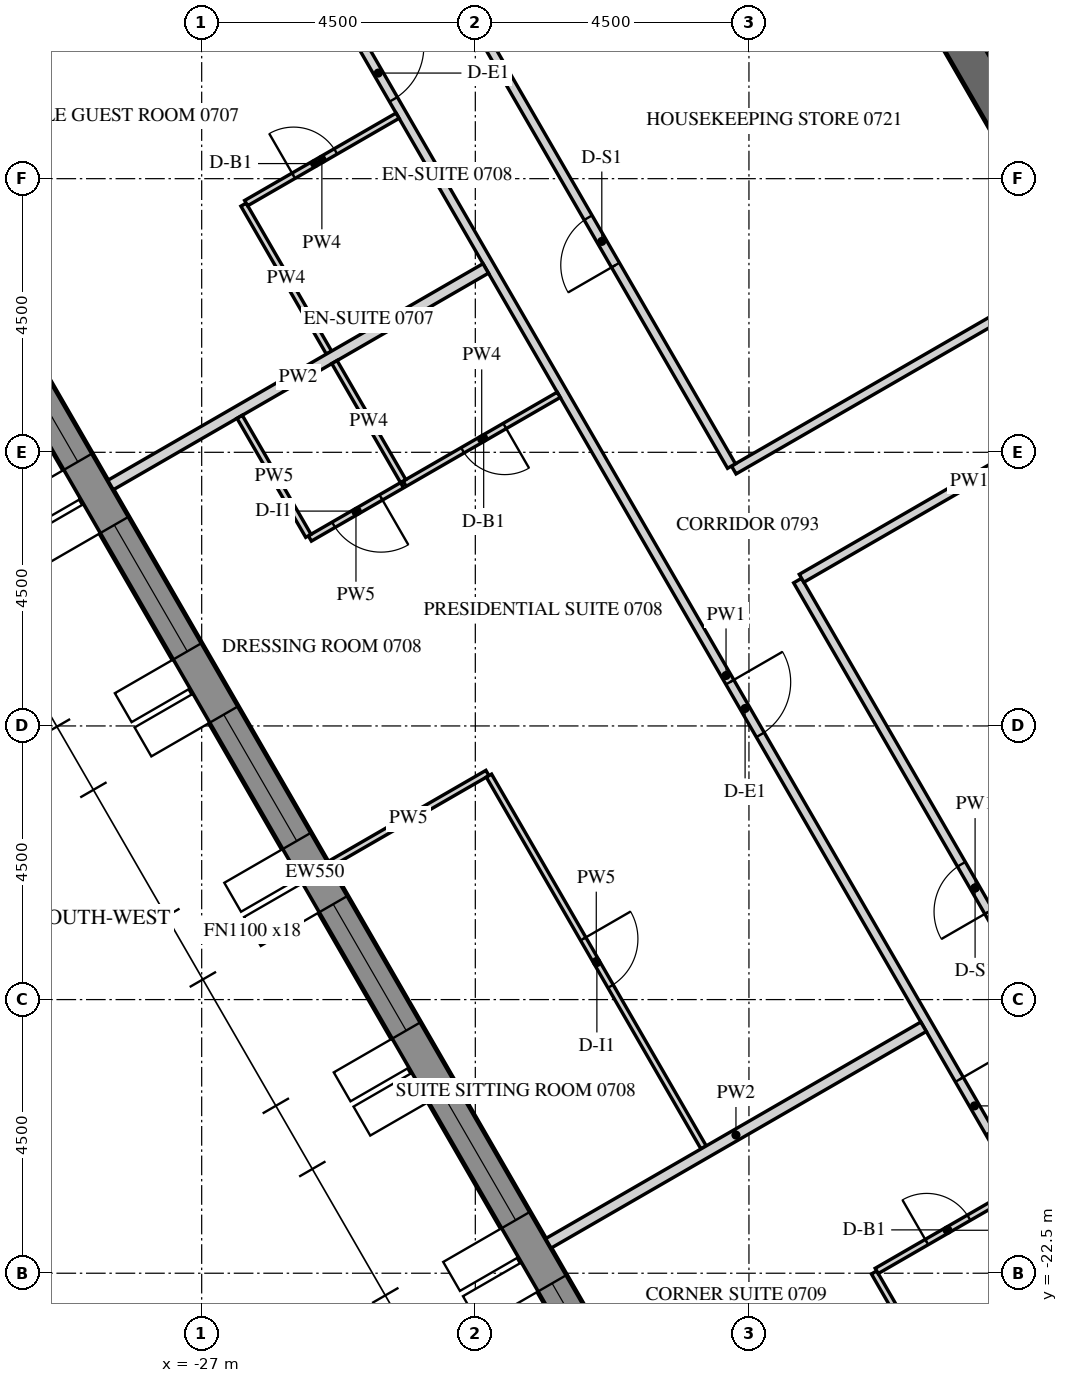
"""IFC4 building model, lengths in metres.
Left out: names, types, materials, properties, quantities, classifications, styles, units other than length and angle.
Written with IfcOpenShell. Run it as: python <this file> out.ifc"""

import sys

from ifc_helpers import new_model, si_unit, direction, frame, frame_2d, origin, place, context, subcontext, project, spatial, polyline, rectangle, outline, extrude, element, fill, save


model = new_model("IFC4")
c1 = context("Model", 3, precision=1e-05, world=origin(), true_north=direction((0.0, 1.0)))
c2 = subcontext(c1, "Body", "Model", "MODEL_VIEW")
j1 = project(units=[si_unit("LENGTHUNIT", "METRE"), si_unit("PLANEANGLEUNIT", "RADIAN")], contexts=[c1])
p1 = place(None, origin())
s1 = spatial("IfcSite", under=j1, at=p1, CompositionType="ELEMENT")
p2 = place(p1, origin())
s2 = spatial("IfcBuilding", under=s1, at=p2, CompositionType="ELEMENT")
p3 = place(p2, frame((0.0, 0.0, 99.9)))
s3 = spatial("IfcBuildingStorey", under=s2, at=p3, CompositionType="ELEMENT", Elevation=99.9)
p4 = place(p3, frame((-32.655, -2.89, -0.15), z_axis=(0.0, 0.0, 1.0), x_axis=(0.499997711317, -0.866026725152, 0.0)))
e1 = element("IfcWall", 1, at=p4, inside=s3, PredefinedType="SOLIDWALL", context=c2, shape_type="SweptSolid", body=[
    extrude(outline(polyline([(-0.022, -0.275), (30.097, -0.275), (30.045, 0.275), (0.022, 0.275), (-0.022, -0.275)])), origin(), (0.0, 0.0, 1.0), 3.9),
])
p5 = place(p4, frame((1.236, 0.0, 1.05)))
e2 = element("IfcOpeningElement", 2, at=p5, cuts=e1, PredefinedType="OPENING", context=c2, shape_type="SweptSolid", body=[
    extrude(rectangle(XDim=2.4, YDim=2.4, at=frame_2d((1.2, 1.2))), frame((0.0, 0.285, 0.0), z_axis=(0.0, -1.0, 0.0), x_axis=(1.0, 0.0, 0.0)), (0.0, 0.0, 1.0), 0.57),
])
p6 = place(p4, frame((4.835, 0.0, 1.05)))
e3 = element("IfcOpeningElement", 3, at=p6, cuts=e1, PredefinedType="OPENING", context=c2, shape_type="SweptSolid", body=[
    extrude(rectangle(XDim=2.4, YDim=2.4, at=frame_2d((1.2, 1.2))), frame((0.0, 0.285, 0.0), z_axis=(0.0, -1.0, 0.0), x_axis=(1.0, 0.0, 0.0)), (0.0, 0.0, 1.0), 0.57),
])
p7 = place(p4, frame((8.436, 0.0, 1.05)))
e4 = element("IfcOpeningElement", 4, at=p7, cuts=e1, PredefinedType="OPENING", context=c2, shape_type="SweptSolid", body=[
    extrude(rectangle(XDim=2.4, YDim=2.4, at=frame_2d((1.2, 1.2))), frame((0.0, 0.285, 0.0), z_axis=(0.0, -1.0, 0.0), x_axis=(1.0, 0.0, 0.0)), (0.0, 0.0, 1.0), 0.57),
])
p8 = place(p4, frame((12.035, 0.0, 1.05)))
e5 = element("IfcOpeningElement", 5, at=p8, cuts=e1, PredefinedType="OPENING", context=c2, shape_type="SweptSolid", body=[
    extrude(rectangle(XDim=2.4, YDim=2.4, at=frame_2d((1.2, 1.2))), frame((0.0, 0.285, 0.0), z_axis=(0.0, -1.0, 0.0), x_axis=(1.0, 0.0, 0.0)), (0.0, 0.0, 1.0), 0.57),
])
p9 = place(p4, frame((15.635, 0.0, 1.05)))
e6 = element("IfcOpeningElement", 6, at=p9, cuts=e1, PredefinedType="OPENING", context=c2, shape_type="SweptSolid", body=[
    extrude(rectangle(XDim=2.4, YDim=2.4, at=frame_2d((1.2, 1.2))), frame((0.0, 0.285, 0.0), z_axis=(0.0, -1.0, 0.0), x_axis=(1.0, 0.0, 0.0)), (0.0, 0.0, 1.0), 0.57),
])
p10 = place(p4, frame((19.236, 0.0, 1.05)))
e7 = element("IfcOpeningElement", 7, at=p10, cuts=e1, PredefinedType="OPENING", context=c2, shape_type="SweptSolid", body=[
    extrude(rectangle(XDim=2.4, YDim=2.4, at=frame_2d((1.2, 1.2))), frame((0.0, 0.285, 0.0), z_axis=(0.0, -1.0, 0.0), x_axis=(1.0, 0.0, 0.0)), (0.0, 0.0, 1.0), 0.57),
])
p11 = place(p4, frame((22.835, 0.0, 1.05)))
e8 = element("IfcOpeningElement", 8, at=p11, cuts=e1, PredefinedType="OPENING", context=c2, shape_type="SweptSolid", body=[
    extrude(rectangle(XDim=2.4, YDim=2.4, at=frame_2d((1.2, 1.2))), frame((0.0, 0.285, 0.0), z_axis=(0.0, -1.0, 0.0), x_axis=(1.0, 0.0, 0.0)), (0.0, 0.0, 1.0), 0.57),
])
p12 = place(p4, frame((26.436, 0.0, 1.05)))
e9 = element("IfcOpeningElement", 9, at=p12, cuts=e1, PredefinedType="OPENING", context=c2, shape_type="SweptSolid", body=[
    extrude(rectangle(XDim=2.4, YDim=2.4, at=frame_2d((1.2, 1.2))), frame((0.0, 0.285, 0.0), z_axis=(0.0, -1.0, 0.0), x_axis=(1.0, 0.0, 0.0)), (0.0, 0.0, 1.0), 0.57),
])
p13 = place(p3, frame((-15.819, 0.0, -0.15), z_axis=(0.0, 0.0, 1.0), x_axis=(0.499999880136, -0.866025472988, 0.0)))
e10 = element("IfcWall", 10, at=p13, inside=s3, PredefinedType="SHEAR", context=c2, shape_type="SweptSolid", body=[
    extrude(outline(polyline([(-0.173, -0.3), (15.993, -0.3), (15.646, 0.3), (0.173, 0.3), (-0.173, -0.3)])), origin(), (0.0, 0.0, 1.0), 3.9),
])
p14 = place(p13, frame((6.981, 0.0, 0.15)))
e11 = element("IfcOpeningElement", 11, at=p14, cuts=e10, PredefinedType="OPENING", context=c2, shape_type="SweptSolid", body=[
    extrude(rectangle(XDim=1.8, YDim=2.4, at=frame_2d((0.9, 1.2))), frame((0.0, 0.31, 0.0), z_axis=(0.0, -1.0, 0.0), x_axis=(1.0, 0.0, 0.0)), (0.0, 0.0, 1.0), 0.62),
])
p15 = place(p3, frame((-24.436, -2.175, 0.0), z_axis=(0.0, 0.0, 1.0), x_axis=(0.499996816197, -0.866027241946, 0.0)))
e12 = element("IfcWall", 12, at=p15, inside=s3, PredefinedType="PARTITIONING", context=c2, shape_type="SweptSolid", body=[
    extrude(rectangle(XDim=24.238, YDim=0.15, at=frame_2d((12.119, 0.0))), origin(), (0.0, 0.0, 1.0), 2.988),
])
p16 = place(p15, frame((0.179, 0.0, 0.0)))
e13 = element("IfcOpeningElement", 13, at=p16, cuts=e12, PredefinedType="OPENING", context=c2, shape_type="SweptSolid", body=[
    extrude(rectangle(XDim=1.0, YDim=2.1, at=frame_2d((0.5, 1.05))), frame((0.0, 0.085, 0.0), z_axis=(0.0, -1.0, 0.0), x_axis=(1.0, 0.0, 0.0)), (0.0, 0.0, 1.0), 0.17),
])
p17 = place(p15, frame((12.246, 0.0, 0.0)))
e14 = element("IfcOpeningElement", 14, at=p17, cuts=e12, PredefinedType="OPENING", context=c2, shape_type="SweptSolid", body=[
    extrude(rectangle(XDim=1.0, YDim=2.1, at=frame_2d((0.5, 1.05))), frame((0.0, 0.085, 0.0), z_axis=(0.0, -1.0, 0.0), x_axis=(1.0, 0.0, 0.0)), (0.0, 0.0, 1.0), 0.17),
])
p18 = place(p15, frame((19.792, 0.0, 0.0)))
e15 = element("IfcOpeningElement", 15, at=p18, cuts=e12, PredefinedType="OPENING", context=c2, shape_type="SweptSolid", body=[
    extrude(rectangle(XDim=1.0, YDim=2.1, at=frame_2d((0.5, 1.05))), frame((0.0, 0.085, 0.0), z_axis=(0.0, -1.0, 0.0), x_axis=(1.0, 0.0, 0.0)), (0.0, 0.0, 1.0), 0.17),
])
p19 = place(p3, frame((-12.664, -6.066, 0.0), z_axis=(0.0, 0.0, 1.0), x_axis=(-0.866021702275, -0.500006411147, 0.0)))
e16 = element("IfcWall", 16, at=p19, inside=s3, PredefinedType="PARTITIONING", context=c2, shape_type="SweptSolid", body=[
    extrude(rectangle(XDim=6.45, YDim=0.15, at=frame_2d((3.225, 0.0))), origin(), (0.0, 0.0, 1.0), 2.988),
])
p20 = place(p3, frame((-18.287, -9.226, 0.0), z_axis=(0.0, 0.0, 1.0), x_axis=(-0.500004853958, 0.866022601332, 0.0)))
e17 = element("IfcWall", 17, at=p20, inside=s3, PredefinedType="PARTITIONING", context=c2, shape_type="SweptSolid", body=[
    extrude(rectangle(XDim=8.531, YDim=0.15, at=frame_2d((4.266, 0.0))), origin(), (0.0, 0.0, 1.0), 2.988),
])
p21 = place(p20, frame((3.816, 0.0, 0.0)))
e18 = element("IfcOpeningElement", 18, at=p21, cuts=e17, PredefinedType="OPENING", context=c2, shape_type="SweptSolid", body=[
    extrude(rectangle(XDim=0.9, YDim=2.1, at=frame_2d((0.45, 1.05))), frame((0.0, 0.085, 0.0), z_axis=(0.0, -1.0, 0.0), x_axis=(1.0, 0.0, 0.0)), (0.0, 0.0, 1.0), 0.17),
])
p22 = place(p3, frame((-11.363, -21.219, 0.0), z_axis=(0.0, 0.0, 1.0), x_axis=(-0.50001451402, 0.866017023949, 0.0)))
e19 = element("IfcWall", 19, at=p22, inside=s3, PredefinedType="PARTITIONING", context=c2, shape_type="SweptSolid", body=[
    extrude(rectangle(XDim=11.674, YDim=0.15, at=frame_2d((5.837, 0.0))), origin(), (0.0, 0.0, 1.0), 2.988),
])
p23 = place(p22, frame((5.387, 0.0, 0.0)))
e20 = element("IfcOpeningElement", 20, at=p23, cuts=e19, PredefinedType="OPENING", context=c2, shape_type="SweptSolid", body=[
    extrude(rectangle(XDim=0.9, YDim=2.1, at=frame_2d((0.45, 1.05))), frame((0.0, 0.085, 0.0), z_axis=(0.0, -1.0, 0.0), x_axis=(1.0, 0.0, 0.0)), (0.0, 0.0, 1.0), 0.17),
])
p24 = place(p3, frame((-17.135, -11.072, 0.0), z_axis=(0.0, 0.0, 1.0), x_axis=(0.866028703517, 0.499994284652, 0.0)))
e21 = element("IfcWall", 21, at=p24, inside=s3, PredefinedType="PARTITIONING", context=c2, shape_type="SweptSolid", body=[
    extrude(rectangle(XDim=6.375, YDim=0.15, at=frame_2d((3.188, 0.0))), origin(), (0.0, 0.0, 1.0), 2.988),
])
p25 = place(p3, frame((-24.907, -7.361, 0.0), z_axis=(0.0, 0.0, 1.0), x_axis=(-0.499933044277, 0.866064057238, 0.0)))
e22 = element("IfcWall", 22, at=p25, inside=s3, PredefinedType="PARTITIONING", context=c2, shape_type="SweptSolid", body=[
    extrude(rectangle(XDim=2.81, YDim=0.1, at=frame_2d((1.405, 0.0))), origin(), (0.0, 0.0, 1.0), 2.988),
])
p26 = place(p3, frame((-26.268, -4.902, 0.0), z_axis=(0.0, 0.0, 1.0), x_axis=(0.866018712932, 0.500011588718, 0.0)))
e23 = element("IfcWall", 23, at=p26, inside=s3, PredefinedType="PARTITIONING", context=c2, shape_type="SweptSolid", body=[
    extrude(rectangle(XDim=2.875, YDim=0.1, at=frame_2d((1.438, 0.0))), origin(), (0.0, 0.0, 1.0), 2.988),
])
p27 = place(p26, frame((0.9, 0.0, 0.0)))
e24 = element("IfcOpeningElement", 24, at=p27, cuts=e23, PredefinedType="OPENING", context=c2, shape_type="SweptSolid", body=[
    extrude(rectangle(XDim=0.8, YDim=2.1, at=frame_2d((0.4, 1.05))), frame((0.0, 0.06, 0.0), z_axis=(0.0, -1.0, 0.0), x_axis=(1.0, 0.0, 0.0)), (0.0, 0.0, 1.0), 0.12),
])
p28 = place(p3, frame((-28.499, -9.538, 0.0), z_axis=(0.0, 0.0, 1.0), x_axis=(0.866024672353, 0.500001266874, 0.0)))
e25 = element("IfcWall", 25, at=p28, inside=s3, PredefinedType="PARTITIONING", context=c2, shape_type="SweptSolid", body=[
    extrude(rectangle(XDim=7.125, YDim=0.18, at=frame_2d((3.562, 0.0))), origin(), (0.0, 0.0, 1.0), 2.988),
])
p29 = place(p3, frame((-21.128, -8.054, 0.0), z_axis=(0.0, 0.0, 1.0), x_axis=(-0.866046596414, -0.499963291492, 0.0)))
e26 = element("IfcWall", 26, at=p29, inside=s3, PredefinedType="PARTITIONING", context=c2, shape_type="SweptSolid", body=[
    extrude(rectangle(XDim=2.925, YDim=0.1, at=frame_2d((1.462, 0.0))), origin(), (0.0, 0.0, 1.0), 2.988),
])
p30 = place(p29, frame((1.025, 0.0, 0.0)))
e27 = element("IfcOpeningElement", 27, at=p30, cuts=e26, PredefinedType="OPENING", context=c2, shape_type="SweptSolid", body=[
    extrude(rectangle(XDim=0.8, YDim=2.1, at=frame_2d((0.4, 1.05))), frame((0.0, 0.06, 0.0), z_axis=(0.0, -1.0, 0.0), x_axis=(1.0, 0.0, 0.0)), (0.0, 0.0, 1.0), 0.12),
])
p31 = place(p3, frame((-23.705, -9.542, 0.0), z_axis=(0.0, 0.0, 1.0), x_axis=(-0.866036909293, -0.499980071345, 0.0)))
e28 = element("IfcWall", 28, at=p31, inside=s3, PredefinedType="PARTITIONING", context=c2, shape_type="SweptSolid", body=[
    extrude(rectangle(XDim=1.75, YDim=0.1, at=frame_2d((0.875, 0.0))), origin(), (0.0, 0.0, 1.0), 2.988),
])
p32 = place(p31, frame((0.4, 0.0, 0.0)))
e29 = element("IfcOpeningElement", 29, at=p32, cuts=e28, PredefinedType="OPENING", context=c2, shape_type="SweptSolid", body=[
    extrude(rectangle(XDim=0.9, YDim=2.1, at=frame_2d((0.45, 1.05))), frame((0.0, 0.06, 0.0), z_axis=(0.0, -1.0, 0.0), x_axis=(1.0, 0.0, 0.0)), (0.0, 0.0, 1.0), 0.12),
])
p33 = place(p3, frame((-25.245, -10.374, 0.0), z_axis=(0.0, 0.0, 1.0), x_axis=(-0.500031020067, 0.8660074936, 0.0)))
e30 = element("IfcWall", 30, at=p33, inside=s3, PredefinedType="PARTITIONING", context=c2, shape_type="SweptSolid", body=[
    extrude(rectangle(XDim=2.26, YDim=0.1, at=frame_2d((1.13, 0.0))), origin(), (0.0, 0.0, 1.0), 2.988),
])
p34 = place(p3, frame((-24.899, -15.774, 0.0), z_axis=(0.0, 0.0, 1.0), x_axis=(0.866066333729, 0.499929100554, 0.0)))
e31 = element("IfcWall", 31, at=p34, inside=s3, PredefinedType="PARTITIONING", context=c2, shape_type="SweptSolid", body=[
    extrude(rectangle(XDim=3.0, YDim=0.1, at=frame_2d((1.5, 0.0))), origin(), (0.0, 0.0, 1.0), 2.988),
])
p35 = place(p3, frame((-22.276, -14.317, 0.0), z_axis=(0.0, 0.0, 1.0), x_axis=(0.500010820671, -0.866019156377, 0.0)))
e32 = element("IfcWall", 32, at=p35, inside=s3, PredefinedType="PARTITIONING", context=c2, shape_type="SweptSolid", body=[
    extrude(rectangle(XDim=7.06, YDim=0.1, at=frame_2d((3.53, 0.0))), origin(), (0.0, 0.0, 1.0), 2.988),
])
p36 = place(p35, frame((3.1, 0.0, 0.0)))
e33 = element("IfcOpeningElement", 33, at=p36, cuts=e32, PredefinedType="OPENING", context=c2, shape_type="SweptSolid", body=[
    extrude(rectangle(XDim=0.9, YDim=2.1, at=frame_2d((0.45, 1.05))), frame((0.0, 0.06, 0.0), z_axis=(0.0, -1.0, 0.0), x_axis=(1.0, 0.0, 0.0)), (0.0, 0.0, 1.0), 0.12),
])
p37 = place(p3, frame((-21.299, -22.009, 0.0), z_axis=(0.0, 0.0, 1.0), x_axis=(0.866024672353, 0.500001266874, 0.0)))
e34 = element("IfcWall", 34, at=p37, inside=s3, PredefinedType="PARTITIONING", context=c2, shape_type="SweptSolid", body=[
    extrude(rectangle(XDim=7.125, YDim=0.18, at=frame_2d((3.562, 0.0))), origin(), (0.0, 0.0, 1.0), 2.988),
])
p38 = place(p3, frame((-24.817, -7.516, 0.0), z_axis=(0.0, 0.0, 1.0), x_axis=(0.500031020067, -0.8660074936, 0.0)))
e35 = element("IfcWall", 35, at=p38, inside=s3, PredefinedType="PARTITIONING", context=c2, shape_type="SweptSolid", body=[
    extrude(rectangle(XDim=2.26, YDim=0.1, at=frame_2d((1.13, 0.0))), origin(), (0.0, 0.0, 1.0), 2.988),
])
p39 = place(p3, frame((-14.767, -24.522, 0.0), z_axis=(0.0, 0.0, 1.0), x_axis=(-0.499938297808, 0.866061024631, 0.0)))
e36 = element("IfcWall", 36, at=p39, inside=s3, PredefinedType="PARTITIONING", context=c2, shape_type="SweptSolid", body=[
    extrude(rectangle(XDim=2.35, YDim=0.1, at=frame_2d((1.175, 0.0))), origin(), (0.0, 0.0, 1.0), 2.988),
])
p40 = place(p3, frame((-15.899, -22.462, 0.0), z_axis=(0.0, 0.0, 1.0), x_axis=(0.86604424267, 0.499967368674, 0.0)))
e37 = element("IfcWall", 37, at=p40, inside=s3, PredefinedType="PARTITIONING", context=c2, shape_type="SweptSolid", body=[
    extrude(rectangle(XDim=2.675, YDim=0.1, at=frame_2d((1.337, 0.0))), origin(), (0.0, 0.0, 1.0), 2.988),
])
p41 = place(p40, frame((0.95, 0.0, 0.0)))
e38 = element("IfcOpeningElement", 38, at=p41, cuts=e37, PredefinedType="OPENING", context=c2, shape_type="SweptSolid", body=[
    extrude(rectangle(XDim=0.8, YDim=2.1, at=frame_2d((0.4, 1.05))), frame((0.0, 0.06, 0.0), z_axis=(0.0, -1.0, 0.0), x_axis=(1.0, 0.0, 0.0)), (0.0, 0.0, 1.0), 0.12),
])
p42 = place(p6, frame((0.0, 0.205, 0.0)))
e39 = element("IfcWindow", 39, at=p42, inside=s3, PartitioningType="DOUBLE_PANEL_VERTICAL", PredefinedType="WINDOW", context=c2, shape_type="SweptSolid", body=[
    extrude(rectangle(XDim=2.4, YDim=2.4, at=frame_2d((1.2, 1.2))), frame((0.0, 0.03, 0.0), z_axis=(0.0, -1.0, 0.0), x_axis=(1.0, 0.0, 0.0)), (0.0, 0.0, 1.0), 0.06),
])
fill(e3, e39)
p43 = place(p7, frame((0.0, 0.205, 0.0)))
e40 = element("IfcWindow", 40, at=p43, inside=s3, PartitioningType="DOUBLE_PANEL_VERTICAL", PredefinedType="WINDOW", context=c2, shape_type="SweptSolid", body=[
    extrude(rectangle(XDim=2.4, YDim=2.4, at=frame_2d((1.2, 1.2))), frame((0.0, 0.03, 0.0), z_axis=(0.0, -1.0, 0.0), x_axis=(1.0, 0.0, 0.0)), (0.0, 0.0, 1.0), 0.06),
])
fill(e4, e40)
p44 = place(p8, frame((0.0, 0.205, 0.0)))
e41 = element("IfcWindow", 41, at=p44, inside=s3, PartitioningType="DOUBLE_PANEL_VERTICAL", PredefinedType="WINDOW", context=c2, shape_type="SweptSolid", body=[
    extrude(rectangle(XDim=2.4, YDim=2.4, at=frame_2d((1.2, 1.2))), frame((0.0, 0.03, 0.0), z_axis=(0.0, -1.0, 0.0), x_axis=(1.0, 0.0, 0.0)), (0.0, 0.0, 1.0), 0.06),
])
fill(e5, e41)
p45 = place(p9, frame((0.0, 0.205, 0.0)))
e42 = element("IfcWindow", 42, at=p45, inside=s3, PartitioningType="DOUBLE_PANEL_VERTICAL", PredefinedType="WINDOW", context=c2, shape_type="SweptSolid", body=[
    extrude(rectangle(XDim=2.4, YDim=2.4, at=frame_2d((1.2, 1.2))), frame((0.0, 0.03, 0.0), z_axis=(0.0, -1.0, 0.0), x_axis=(1.0, 0.0, 0.0)), (0.0, 0.0, 1.0), 0.06),
])
fill(e6, e42)
p46 = place(p10, frame((0.0, 0.205, 0.0)))
e43 = element("IfcWindow", 43, at=p46, inside=s3, PartitioningType="DOUBLE_PANEL_VERTICAL", PredefinedType="WINDOW", context=c2, shape_type="SweptSolid", body=[
    extrude(rectangle(XDim=2.4, YDim=2.4, at=frame_2d((1.2, 1.2))), frame((0.0, 0.03, 0.0), z_axis=(0.0, -1.0, 0.0), x_axis=(1.0, 0.0, 0.0)), (0.0, 0.0, 1.0), 0.06),
])
fill(e7, e43)
p47 = place(p11, frame((0.0, 0.205, 0.0)))
e44 = element("IfcWindow", 44, at=p47, inside=s3, PartitioningType="DOUBLE_PANEL_VERTICAL", PredefinedType="WINDOW", context=c2, shape_type="SweptSolid", body=[
    extrude(rectangle(XDim=2.4, YDim=2.4, at=frame_2d((1.2, 1.2))), frame((0.0, 0.03, 0.0), z_axis=(0.0, -1.0, 0.0), x_axis=(1.0, 0.0, 0.0)), (0.0, 0.0, 1.0), 0.06),
])
fill(e8, e44)
p48 = place(p16, origin())
e45 = element("IfcDoor", 45, at=p48, inside=s3, OperationType="SINGLE_SWING_RIGHT", PredefinedType="DOOR", context=c2, shape_type="SweptSolid", body=[
    extrude(rectangle(XDim=1.0, YDim=2.1, at=frame_2d((0.5, 1.05))), frame((0.0, 0.025, 0.0), z_axis=(0.0, -1.0, 0.0), x_axis=(1.0, 0.0, 0.0)), (0.0, 0.0, 1.0), 0.05),
])
fill(e13, e45)
p49 = place(p27, origin())
e46 = element("IfcDoor", 46, at=p49, inside=s3, OperationType="SINGLE_SWING_RIGHT", PredefinedType="DOOR", context=c2, shape_type="SweptSolid", body=[
    extrude(rectangle(XDim=0.8, YDim=2.1, at=frame_2d((0.4, 1.05))), frame((0.0, 0.025, 0.0), z_axis=(0.0, -1.0, 0.0), x_axis=(1.0, 0.0, 0.0)), (0.0, 0.0, 1.0), 0.05),
])
fill(e24, e46)
p50 = place(p17, origin())
e47 = element("IfcDoor", 47, at=p50, inside=s3, OperationType="SINGLE_SWING_RIGHT", PredefinedType="DOOR", context=c2, shape_type="SweptSolid", body=[
    extrude(rectangle(XDim=1.0, YDim=2.1, at=frame_2d((0.5, 1.05))), frame((0.0, 0.025, 0.0), z_axis=(0.0, -1.0, 0.0), x_axis=(1.0, 0.0, 0.0)), (0.0, 0.0, 1.0), 0.05),
])
fill(e14, e47)
p51 = place(p30, origin())
e48 = element("IfcDoor", 48, at=p51, inside=s3, OperationType="SINGLE_SWING_RIGHT", PredefinedType="DOOR", context=c2, shape_type="SweptSolid", body=[
    extrude(rectangle(XDim=0.8, YDim=2.1, at=frame_2d((0.4, 1.05))), frame((0.0, 0.025, 0.0), z_axis=(0.0, -1.0, 0.0), x_axis=(1.0, 0.0, 0.0)), (0.0, 0.0, 1.0), 0.05),
])
fill(e27, e48)
p52 = place(p32, origin())
e49 = element("IfcDoor", 49, at=p52, inside=s3, OperationType="SINGLE_SWING_RIGHT", PredefinedType="DOOR", context=c2, shape_type="SweptSolid", body=[
    extrude(rectangle(XDim=0.9, YDim=2.1, at=frame_2d((0.45, 1.05))), frame((0.0, 0.025, 0.0), z_axis=(0.0, -1.0, 0.0), x_axis=(1.0, 0.0, 0.0)), (0.0, 0.0, 1.0), 0.05),
])
fill(e29, e49)
p53 = place(p36, origin())
e50 = element("IfcDoor", 50, at=p53, inside=s3, OperationType="SINGLE_SWING_LEFT", PredefinedType="DOOR", context=c2, shape_type="SweptSolid", body=[
    extrude(rectangle(XDim=0.9, YDim=2.1, at=frame_2d((0.45, 1.05))), frame((0.0, 0.025, 0.0), z_axis=(0.0, -1.0, 0.0), x_axis=(1.0, 0.0, 0.0)), (0.0, 0.0, 1.0), 0.05),
])
fill(e33, e50)
p54 = place(p18, origin())
e51 = element("IfcDoor", 51, at=p54, inside=s3, OperationType="SINGLE_SWING_RIGHT", PredefinedType="DOOR", context=c2, shape_type="SweptSolid", body=[
    extrude(rectangle(XDim=1.0, YDim=2.1, at=frame_2d((0.5, 1.05))), frame((0.0, 0.025, 0.0), z_axis=(0.0, -1.0, 0.0), x_axis=(1.0, 0.0, 0.0)), (0.0, 0.0, 1.0), 0.05),
])
fill(e15, e51)
p55 = place(p41, origin())
e52 = element("IfcDoor", 52, at=p55, inside=s3, OperationType="SINGLE_SWING_RIGHT", PredefinedType="DOOR", context=c2, shape_type="SweptSolid", body=[
    extrude(rectangle(XDim=0.8, YDim=2.1, at=frame_2d((0.4, 1.05))), frame((0.0, 0.025, 0.0), z_axis=(0.0, -1.0, 0.0), x_axis=(1.0, 0.0, 0.0)), (0.0, 0.0, 1.0), 0.05),
])
fill(e38, e52)
p56 = place(p21, origin())
e53 = element("IfcDoor", 53, at=p56, inside=s3, OperationType="SINGLE_SWING_RIGHT", PredefinedType="DOOR", context=c2, shape_type="SweptSolid", body=[
    extrude(rectangle(XDim=0.9, YDim=2.1, at=frame_2d((0.45, 1.05))), frame((0.0, 0.025, 0.0), z_axis=(0.0, -1.0, 0.0), x_axis=(1.0, 0.0, 0.0)), (0.0, 0.0, 1.0), 0.05),
])
fill(e18, e53)
p57 = place(p23, origin())
e54 = element("IfcDoor", 54, at=p57, inside=s3, OperationType="SINGLE_SWING_RIGHT", PredefinedType="DOOR", context=c2, shape_type="SweptSolid", body=[
    extrude(rectangle(XDim=0.9, YDim=2.1, at=frame_2d((0.45, 1.05))), frame((0.0, 0.025, 0.0), z_axis=(0.0, -1.0, 0.0), x_axis=(1.0, 0.0, 0.0)), (0.0, 0.0, 1.0), 0.05),
])
fill(e20, e54)
save(model, sys.argv[1])
